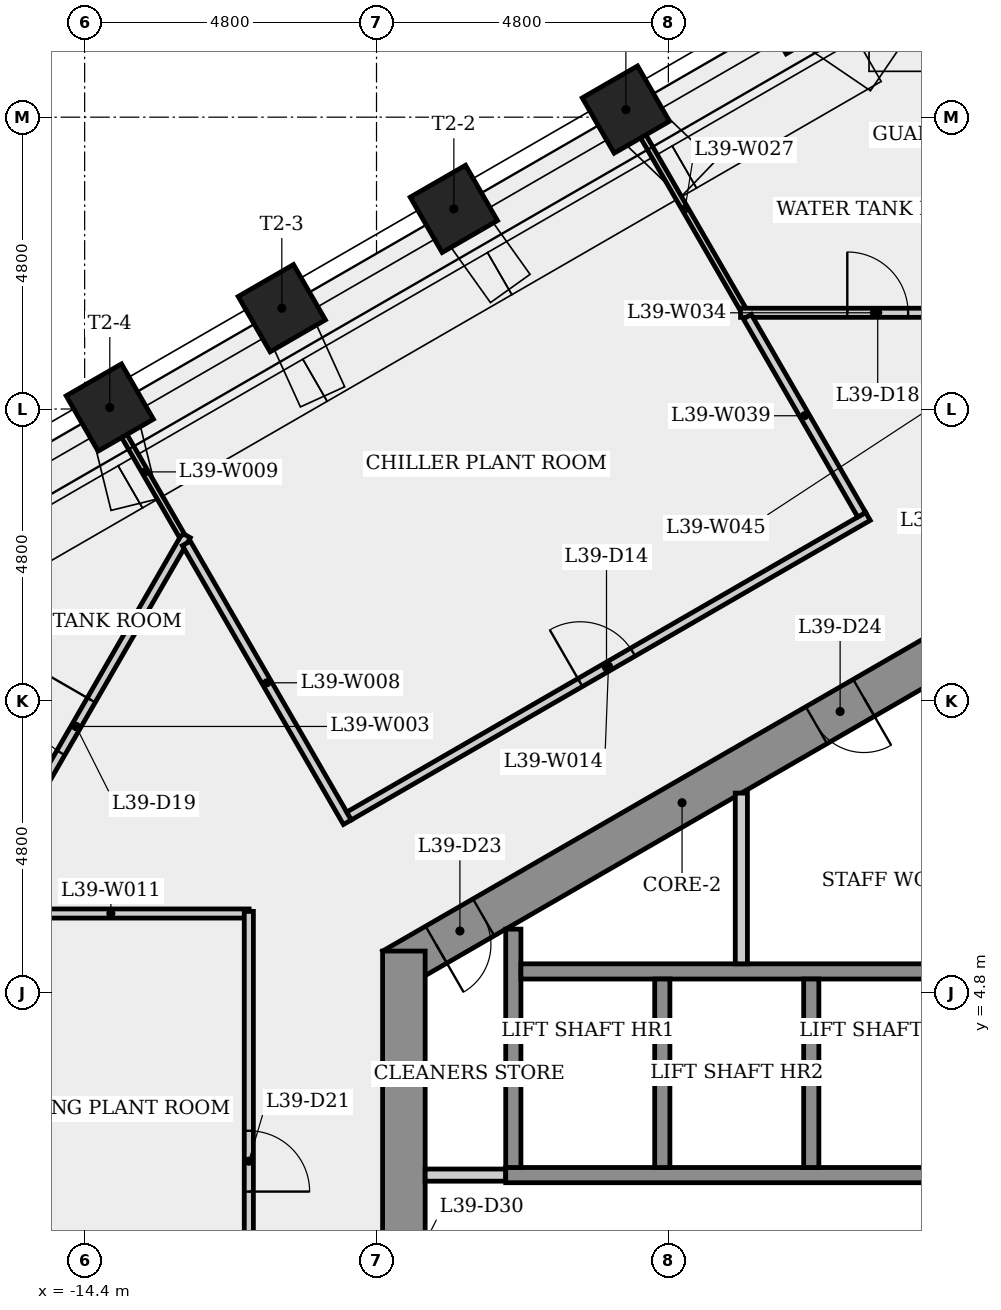
"""IFC4 building model, lengths in metres.
Left out: names, types, materials, properties, quantities, classifications, styles, units other than length and angle.
Written with IfcOpenShell. Run it as: python <this file> out.ifc"""

import sys

from ifc_helpers import new_model, si_unit, direction, frame, frame_2d, origin, origin_2d, place, context, subcontext, project, spatial, rectangle, extrude, element, fill, save


model = new_model("IFC4")
c1 = context("Model", 3, precision=1e-05, world=origin(), true_north=direction((0.0, 1.0)))
c2 = subcontext(c1, "Body", "Model", "MODEL_VIEW")
j1 = project(units=[si_unit("LENGTHUNIT", "METRE"), si_unit("PLANEANGLEUNIT", "RADIAN")], contexts=[c1])
p1 = place(None, origin())
s1 = spatial("IfcSite", under=j1, at=p1, CompositionType="ELEMENT")
p2 = place(p1, origin())
s2 = spatial("IfcBuilding", under=s1, at=p2, CompositionType="ELEMENT")
p3 = place(p2, frame((0.0, 0.0, 147.9)))
s3 = spatial("IfcBuildingStorey", under=s2, at=p3, CompositionType="ELEMENT", Elevation=147.9)
p4 = place(p3, frame((0.175, 10.667, 0.0), z_axis=(0.0, 0.0, 1.0), x_axis=(-0.866023993627, -0.500002442456, 0.0)))
e1 = element("IfcWall", 1, at=p4, inside=s3, PredefinedType="SHEAR", context=c2, shape_type="SweptSolid", body=[
    extrude(rectangle(XDim=10.97, YDim=0.7, at=frame_2d((5.485, 0.0))), origin(), (0.0, 0.0, 1.0), 4.8),
])
p5 = place(p4, frame((9.254, 0.0, 0.0)))
e2 = element("IfcOpeningElement", 2, at=p5, cuts=e1, PredefinedType="OPENING", context=c2, shape_type="SweptSolid", body=[
    extrude(rectangle(XDim=0.9, YDim=2.1, at=frame_2d((0.45, 1.05))), frame((0.0, 0.36, 0.0), z_axis=(0.0, -1.0, 0.0), x_axis=(1.0, 0.0, 0.0)), (0.0, 0.0, 1.0), 0.72),
])
p6 = place(p4, frame((2.033, 0.0, 0.0)))
e3 = element("IfcOpeningElement", 3, at=p6, cuts=e1, PredefinedType="OPENING", context=c2, shape_type="SweptSolid", body=[
    extrude(rectangle(XDim=0.9, YDim=2.1, at=frame_2d((0.45, 1.05))), frame((0.0, 0.36, 0.0), z_axis=(0.0, -1.0, 0.0), x_axis=(1.0, 0.0, 0.0)), (0.0, 0.0, 1.0), 0.72),
])
p7 = place(p3, frame((-9.15, 5.485, 0.0), z_axis=(0.0, 0.0, 1.0), x_axis=(0.0, -1.0, 0.0)))
e4 = element("IfcWall", 4, at=p7, inside=s3, PredefinedType="SHEAR", context=c2, shape_type="SweptSolid", body=[
    extrude(rectangle(XDim=10.97, YDim=0.7, at=frame_2d((5.485, 0.0))), origin(), (0.0, 0.0, 1.0), 4.8),
])
p8 = place(p7, frame((4.685, 0.0, 0.0)))
e5 = element("IfcOpeningElement", 5, at=p8, cuts=e4, PredefinedType="OPENING", context=c2, shape_type="SweptSolid", body=[
    extrude(rectangle(XDim=1.6, YDim=2.1, at=frame_2d((0.8, 1.05))), frame((0.0, 0.36, 0.0), z_axis=(0.0, -1.0, 0.0), x_axis=(1.0, 0.0, 0.0)), (0.0, 0.0, 1.0), 0.72),
])
for number, where, z_axis, x_axis in (
    (6, (-2.67, 20.958, 0.0), (0.0, 0.0, 1.0), (-0.5, 0.866, 0.0)),
    (7, (-5.499, 19.325, 0.0), (0.0, 0.0, 1.0), (-0.5, 0.866, 0.0)),
    (8, (-8.328, 17.692, 0.0), (0.0, 0.0, 1.0), (-0.5, 0.866, 0.0)),
    (9, (-11.157, 16.058, 0.0), (0.0, 0.0, 1.0), (-0.5, 0.866, 0.0)),
    (10, (-13.987, 14.425, 0.0), (0.0, 0.0, 1.0), (-0.5, 0.866, 0.0)),
):
    element("IfcColumn", number, at=place(p3, frame(where, z_axis=z_axis, x_axis=x_axis)), inside=s3, PredefinedType="COLUMN", context=c2, shape_type="SweptSolid", body=[
        extrude(rectangle(XDim=1.05, YDim=1.05, at=origin_2d()), origin(), (0.0, 0.0, 1.0), 4.45),
    ])
p9 = place(p3, frame((-16.355, 6.038, 0.0), z_axis=(0.0, 0.0, 1.0), x_axis=(0.499982673273, 0.866035407144, 0.0)))
e11 = element("IfcWall", 11, at=p9, inside=s3, PredefinedType="PARTITIONING", context=c2, shape_type="SweptSolid", body=[
    extrude(rectangle(XDim=7.255, YDim=0.15, at=frame_2d((3.627, 0.0))), origin(), (0.0, 0.0, 1.0), 4.45),
])
p10 = place(p9, frame((3.127, 0.0, 0.0)))
e12 = element("IfcOpeningElement", 12, at=p10, cuts=e11, PredefinedType="OPENING", context=c2, shape_type="SweptSolid", body=[
    extrude(rectangle(XDim=1.0, YDim=2.1, at=frame_2d((0.5, 1.05))), frame((0.0, 0.085, 0.0), z_axis=(0.0, -1.0, 0.0), x_axis=(1.0, 0.0, 0.0)), (0.0, 0.0, 1.0), 0.17),
])
p11 = place(p3, frame((-12.728, 12.191, 0.0), z_axis=(0.0, 0.0, 1.0), x_axis=(0.499991120112, -0.86603053053, 0.0)))
e13 = element("IfcWall", 13, at=p11, inside=s3, PredefinedType="PARTITIONING", context=c2, shape_type="SweptSolid", body=[
    extrude(rectangle(XDim=5.296, YDim=0.15, at=frame_2d((2.648, 0.0))), origin(), (0.0, 0.0, 1.0), 4.45),
])
p12 = place(p3, frame((-12.803, 12.321, 0.0), z_axis=(0.0, 0.0, 1.0), x_axis=(-0.499967560512, 0.866044131922, 0.0)))
e14 = element("IfcWall", 14, at=p12, inside=s3, PredefinedType="PARTITIONING", context=c2, shape_type="SweptSolid", body=[
    extrude(rectangle(XDim=2.414, YDim=0.1, at=frame_2d((1.207, 0.0))), origin(), (0.0, 0.0, 1.0), 4.45),
])
p13 = place(p3, frame((-11.695, 6.103, 0.0), z_axis=(0.0, 0.0, 1.0), x_axis=(-1.0, 0.0, 0.0)))
e15 = element("IfcWall", 15, at=p13, inside=s3, PredefinedType="PARTITIONING", context=c2, shape_type="SweptSolid", body=[
    extrude(rectangle(XDim=4.548, YDim=0.15, at=frame_2d((2.274, 0.0))), origin(), (0.0, 0.0, 1.0), 4.45),
])
p14 = place(p3, frame((-11.7, 6.137, 0.0), z_axis=(0.0, 0.0, 1.0), x_axis=(0.0, -1.0, 0.0)))
e16 = element("IfcWall", 16, at=p14, inside=s3, PredefinedType="PARTITIONING", context=c2, shape_type="SweptSolid", body=[
    extrude(rectangle(XDim=12.125, YDim=0.15, at=frame_2d((6.062, 0.0))), origin(), (0.0, 0.0, 1.0), 4.45),
])
p15 = place(p14, frame((3.608, 0.0, 0.0)))
e17 = element("IfcOpeningElement", 17, at=p15, cuts=e16, PredefinedType="OPENING", context=c2, shape_type="SweptSolid", body=[
    extrude(rectangle(XDim=1.0, YDim=2.1, at=frame_2d((0.5, 1.05))), frame((0.0, 0.085, 0.0), z_axis=(0.0, -1.0, 0.0), x_axis=(1.0, 0.0, 0.0)), (0.0, 0.0, 1.0), 0.17),
])
p16 = place(p3, frame((-10.052, 7.706, 0.0), z_axis=(0.0, 0.0, 1.0), x_axis=(0.866017665152, 0.500013403465, 0.0)))
e18 = element("IfcWall", 18, at=p16, inside=s3, PredefinedType="PARTITIONING", context=c2, shape_type="SweptSolid", body=[
    extrude(rectangle(XDim=9.854, YDim=0.15, at=frame_2d((4.927, 0.0))), origin(), (0.0, 0.0, 1.0), 4.45),
])
p17 = place(p16, frame((4.39, 0.0, 0.0)))
e19 = element("IfcOpeningElement", 19, at=p17, cuts=e18, PredefinedType="OPENING", context=c2, shape_type="SweptSolid", body=[
    extrude(rectangle(XDim=1.0, YDim=2.1, at=frame_2d((0.5, 1.05))), frame((0.0, 0.085, 0.0), z_axis=(0.0, -1.0, 0.0), x_axis=(1.0, 0.0, 0.0)), (0.0, 0.0, 1.0), 0.17),
])
p18 = place(p3, frame((-8.8, 1.8, 0.0), z_axis=(0.0, 0.0, 1.0), x_axis=(1.0, 0.0, 0.0)))
e20 = element("IfcWall", 20, at=p18, inside=s3, PredefinedType="PARTITIONING", context=c2, shape_type="SweptSolid", body=[
    extrude(rectangle(XDim=1.325, YDim=0.2, at=frame_2d((0.663, 0.0))), origin(), (0.0, 0.0, 1.0), 4.45),
])
p19 = place(p3, frame((-7.475, 1.8, 0.0), z_axis=(0.0, 0.0, 1.0), x_axis=(1.0, 0.0, 0.0)))
e21 = element("IfcWall", 21, at=p19, inside=s3, PredefinedType="SHEAR", context=c2, shape_type="SweptSolid", body=[
    extrude(rectangle(XDim=14.95, YDim=0.25, at=frame_2d((7.475, 0.0))), origin(), (0.0, 0.0, 1.0), 4.45),
])
p20 = place(p3, frame((-7.35, 1.925, 0.0), z_axis=(0.0, 0.0, 1.0), x_axis=(0.0, 1.0, 0.0)))
e22 = element("IfcWall", 22, at=p20, inside=s3, PredefinedType="SHEAR", context=c2, shape_type="SweptSolid", body=[
    extrude(rectangle(XDim=3.921, YDim=0.25, at=frame_2d((1.96, 0.0))), origin(), (0.0, 0.0, 1.0), 4.45),
])
p21 = place(p3, frame((-7.225, 5.15, 0.0), z_axis=(0.0, 0.0, 1.0), x_axis=(1.0, 0.0, 0.0)))
e23 = element("IfcWall", 23, at=p21, inside=s3, PredefinedType="SHEAR", context=c2, shape_type="SweptSolid", body=[
    extrude(rectangle(XDim=14.7, YDim=0.25, at=frame_2d((7.35, 0.0))), origin(), (0.0, 0.0, 1.0), 4.45),
])
p22 = place(p3, frame((-5.476, 19.339, 0.0), z_axis=(0.0, 0.0, 1.0), x_axis=(0.500015340139, -0.86601654697, 0.0)))
e24 = element("IfcWall", 24, at=p22, inside=s3, PredefinedType="PARTITIONING", context=c2, shape_type="SweptSolid", body=[
    extrude(rectangle(XDim=3.8, YDim=0.1, at=frame_2d((1.9, 0.0))), origin(), (0.0, 0.0, 1.0), 4.45),
])
p23 = place(p3, frame((-4.9, 5.025, 0.0), z_axis=(0.0, 0.0, 1.0), x_axis=(0.0, -1.0, 0.0)))
e25 = element("IfcWall", 25, at=p23, inside=s3, PredefinedType="SHEAR", context=c2, shape_type="SweptSolid", body=[
    extrude(rectangle(XDim=3.1, YDim=0.25, at=frame_2d((1.55, 0.0))), origin(), (0.0, 0.0, 1.0), 4.8),
])
p24 = place(p3, frame((-3.6, 8.083, 0.0), z_axis=(0.0, 0.0, 1.0), x_axis=(0.0, -1.0, 0.0)))
e26 = element("IfcWall", 26, at=p24, inside=s3, PredefinedType="PARTITIONING", context=c2, shape_type="SweptSolid", body=[
    extrude(rectangle(XDim=2.808, YDim=0.2, at=frame_2d((1.404, 0.0))), origin(), (0.0, 0.0, 1.0), 4.45),
])
p25 = place(p3, frame((-3.613, 15.983, 0.0), z_axis=(0.0, 0.0, 1.0), x_axis=(1.0, 0.0, 0.0)))
e27 = element("IfcWall", 27, at=p25, inside=s3, PredefinedType="PARTITIONING", context=c2, shape_type="SweptSolid", body=[
    extrude(rectangle(XDim=4.402, YDim=0.15, at=frame_2d((2.201, 0.0))), origin(), (0.0, 0.0, 1.0), 4.45),
])
p26 = place(p25, frame((1.756, 0.0, 0.0)))
e28 = element("IfcOpeningElement", 28, at=p26, cuts=e27, PredefinedType="OPENING", context=c2, shape_type="SweptSolid", body=[
    extrude(rectangle(XDim=1.0, YDim=2.1, at=frame_2d((0.5, 1.05))), frame((0.0, 0.085, 0.0), z_axis=(0.0, -1.0, 0.0), x_axis=(1.0, 0.0, 0.0)), (0.0, 0.0, 1.0), 0.17),
])
p27 = place(p3, frame((-2.45, 5.025, 0.0), z_axis=(0.0, 0.0, 1.0), x_axis=(0.0, -1.0, 0.0)))
e29 = element("IfcWall", 29, at=p27, inside=s3, PredefinedType="SHEAR", context=c2, shape_type="SweptSolid", body=[
    extrude(rectangle(XDim=3.1, YDim=0.25, at=frame_2d((1.55, 0.0))), origin(), (0.0, 0.0, 1.0), 4.8),
])
p28 = place(p3, frame((-1.621, 12.661, 0.0), z_axis=(0.0, 0.0, 1.0), x_axis=(-0.49997906747, 0.866037488849, 0.0)))
e30 = element("IfcWall", 30, at=p28, inside=s3, PredefinedType="PARTITIONING", context=c2, shape_type="SweptSolid", body=[
    extrude(rectangle(XDim=3.761, YDim=0.15, at=frame_2d((1.88, 0.0))), origin(), (0.0, 0.0, 1.0), 4.45),
])
p29 = place(p17, origin())
e31 = element("IfcDoor", 31, at=p29, inside=s3, OperationType="SINGLE_SWING_LEFT", PredefinedType="DOOR", context=c2, shape_type="SweptSolid", body=[
    extrude(rectangle(XDim=1.0, YDim=2.1, at=frame_2d((0.5, 1.05))), frame((0.0, 0.025, 0.0), z_axis=(0.0, -1.0, 0.0), x_axis=(1.0, 0.0, 0.0)), (0.0, 0.0, 1.0), 0.05),
])
fill(e19, e31)
p30 = place(p26, origin())
e32 = element("IfcDoor", 32, at=p30, inside=s3, OperationType="SINGLE_SWING_LEFT", PredefinedType="DOOR", context=c2, shape_type="SweptSolid", body=[
    extrude(rectangle(XDim=1.0, YDim=2.1, at=frame_2d((0.5, 1.05))), frame((0.0, 0.025, 0.0), z_axis=(0.0, -1.0, 0.0), x_axis=(1.0, 0.0, 0.0)), (0.0, 0.0, 1.0), 0.05),
])
fill(e28, e32)
p31 = place(p10, origin())
e33 = element("IfcDoor", 33, at=p31, inside=s3, OperationType="SINGLE_SWING_RIGHT", PredefinedType="DOOR", context=c2, shape_type="SweptSolid", body=[
    extrude(rectangle(XDim=1.0, YDim=2.1, at=frame_2d((0.5, 1.05))), frame((0.0, 0.025, 0.0), z_axis=(0.0, -1.0, 0.0), x_axis=(1.0, 0.0, 0.0)), (0.0, 0.0, 1.0), 0.05),
])
fill(e12, e33)
p32 = place(p15, origin())
e34 = element("IfcDoor", 34, at=p32, inside=s3, OperationType="SINGLE_SWING_RIGHT", PredefinedType="DOOR", context=c2, shape_type="SweptSolid", body=[
    extrude(rectangle(XDim=1.0, YDim=2.1, at=frame_2d((0.5, 1.05))), frame((0.0, 0.025, 0.0), z_axis=(0.0, -1.0, 0.0), x_axis=(1.0, 0.0, 0.0)), (0.0, 0.0, 1.0), 0.05),
])
fill(e17, e34)
p33 = place(p5, origin())
e35 = element("IfcDoor", 35, at=p33, inside=s3, OperationType="SINGLE_SWING_RIGHT", PredefinedType="DOOR", context=c2, shape_type="SweptSolid", body=[
    extrude(rectangle(XDim=0.9, YDim=2.1, at=frame_2d((0.45, 1.05))), frame((0.0, 0.025, 0.0), z_axis=(0.0, -1.0, 0.0), x_axis=(1.0, 0.0, 0.0)), (0.0, 0.0, 1.0), 0.05),
])
fill(e2, e35)
p34 = place(p6, origin())
e36 = element("IfcDoor", 36, at=p34, inside=s3, OperationType="SINGLE_SWING_LEFT", PredefinedType="DOOR", context=c2, shape_type="SweptSolid", body=[
    extrude(rectangle(XDim=0.9, YDim=2.1, at=frame_2d((0.45, 1.05))), frame((0.0, 0.025, 0.0), z_axis=(0.0, -1.0, 0.0), x_axis=(1.0, 0.0, 0.0)), (0.0, 0.0, 1.0), 0.05),
])
fill(e3, e36)
save(model, sys.argv[1])
